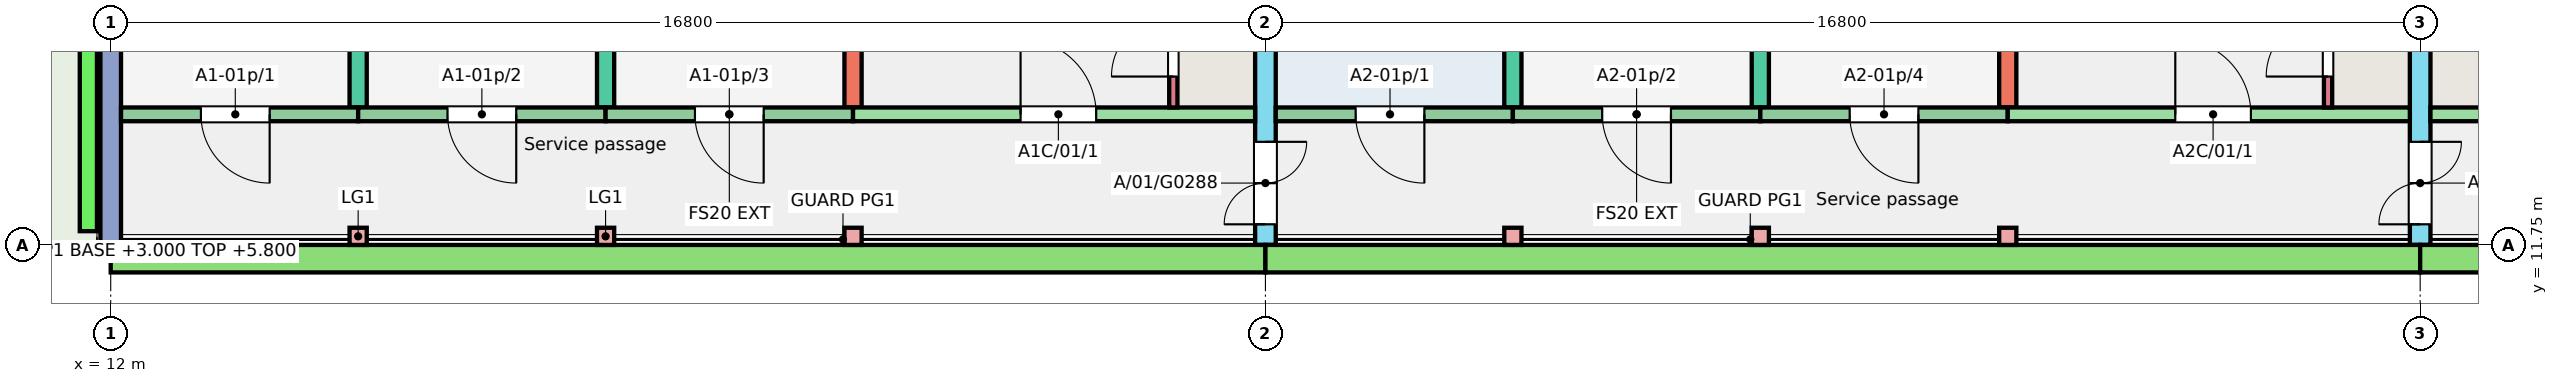
"""IFC4 building model, lengths in metres.
Left out: names, types, materials, properties, quantities, classifications, styles, units other than length and angle.
Written with IfcOpenShell. Run it as: python <this file> out.ifc"""

import sys

from ifc_helpers import new_model, si_unit, direction, frame, frame_2d, origin, origin_2d, place, context, subcontext, project, spatial, rectangle, extrude, element, fill, save


model = new_model("IFC4")
c1 = context("Model", 3, precision=1e-05, world=origin(), true_north=direction((0.0, 1.0)))
c2 = subcontext(c1, "Body", "Model", "MODEL_VIEW")
j1 = project(units=[si_unit("LENGTHUNIT", "METRE"), si_unit("PLANEANGLEUNIT", "RADIAN")], contexts=[c1])
p1 = place(None, origin())
s1 = spatial("IfcSite", under=j1, at=p1, CompositionType="ELEMENT")
p2 = place(p1, origin())
s2 = spatial("IfcBuilding", under=s1, at=p2, CompositionType="ELEMENT")
p3 = place(p2, frame((0.0, 0.0, 3.0)))
s3 = spatial("IfcBuildingStorey", under=s2, at=p3, CompositionType="ELEMENT", Elevation=3.0)
p4 = place(p3, frame((12.0, 11.75, 0.0), z_axis=(0.0, 0.0, 1.0), x_axis=(0.0, 1.0, 0.0)))
e1 = element("IfcWall", 1, at=p4, inside=s3, PredefinedType="SHEAR", context=c2, shape_type="SweptSolid", body=[
    extrude(rectangle(XDim=11.0, YDim=0.3, at=frame_2d((5.5, 0.0))), origin(), (0.0, 0.0, 1.0), 3.0),
])
for number, where, z_axis, x_axis in (
    (2, (15.6, 13.75, 0.0), (0.0, 0.0, 1.0), (0.0, 1.0, 0.0)),
    (3, (19.2, 13.75, 0.0), (0.0, 0.0, 1.0), (0.0, 1.0, 0.0)),
    (4, (22.8, 13.75, 0.0), (0.0, 0.0, 1.0), (0.0, 1.0, 0.0)),
):
    element("IfcWall", number, at=place(p3, frame(where, z_axis=z_axis, x_axis=x_axis)), inside=s3, PredefinedType="SHEAR", context=c2, shape_type="SweptSolid", body=[
        extrude(rectangle(XDim=9.0, YDim=0.25, at=frame_2d((4.5, 0.0))), origin(), (0.0, 0.0, 1.0), 3.0),
    ])
p5 = place(p3, frame((28.8, 11.75, 0.0), z_axis=(0.0, 0.0, 1.0), x_axis=(0.0, 1.0, 0.0)))
e5 = element("IfcWall", 5, at=p5, inside=s3, PredefinedType="SHEAR", context=c2, shape_type="SweptSolid", body=[
    extrude(rectangle(XDim=11.0, YDim=0.3, at=frame_2d((5.5, 0.0))), origin(), (0.0, 0.0, 1.0), 3.0),
])
p6 = place(p5, frame((0.3, 0.0, 0.0)))
e6 = element("IfcOpeningElement", 6, at=p6, cuts=e5, PredefinedType="OPENING", context=c2, shape_type="SweptSolid", body=[
    extrude(rectangle(XDim=1.2, YDim=2.1, at=frame_2d((0.6, 1.05))), frame((0.0, 0.16, 0.0), z_axis=(0.0, -1.0, 0.0), x_axis=(1.0, 0.0, 0.0)), (0.0, 0.0, 1.0), 0.32),
])
for number, where, z_axis, x_axis in (
    (7, (32.4, 13.75, 0.0), (0.0, 0.0, 1.0), (0.0, 1.0, 0.0)),
    (8, (36.0, 13.75, 0.0), (0.0, 0.0, 1.0), (0.0, 1.0, 0.0)),
    (9, (39.6, 13.75, 0.0), (0.0, 0.0, 1.0), (0.0, 1.0, 0.0)),
):
    element("IfcWall", number, at=place(p3, frame(where, z_axis=z_axis, x_axis=x_axis)), inside=s3, PredefinedType="SHEAR", context=c2, shape_type="SweptSolid", body=[
        extrude(rectangle(XDim=9.0, YDim=0.25, at=frame_2d((4.5, 0.0))), origin(), (0.0, 0.0, 1.0), 3.0),
    ])
p7 = place(p3, frame((45.6, 11.75, 0.0), z_axis=(0.0, 0.0, 1.0), x_axis=(0.0, 1.0, 0.0)))
e10 = element("IfcWall", 10, at=p7, inside=s3, PredefinedType="SHEAR", context=c2, shape_type="SweptSolid", body=[
    extrude(rectangle(XDim=11.0, YDim=0.3, at=frame_2d((5.5, 0.0))), origin(), (0.0, 0.0, 1.0), 3.0),
])
p8 = place(p7, frame((0.3, 0.0, 0.0)))
e11 = element("IfcOpeningElement", 11, at=p8, cuts=e10, PredefinedType="OPENING", context=c2, shape_type="SweptSolid", body=[
    extrude(rectangle(XDim=1.2, YDim=2.1, at=frame_2d((0.6, 1.05))), frame((0.0, 0.16, 0.0), z_axis=(0.0, -1.0, 0.0), x_axis=(1.0, 0.0, 0.0)), (0.0, 0.0, 1.0), 0.32),
])
p9 = place(p3, frame((12.15, 13.65, 0.0), z_axis=(0.0, 0.0, 1.0), x_axis=(1.0, 0.0, 0.0)))
e12 = element("IfcWall", 12, at=p9, inside=s3, PredefinedType="SOLIDWALL", context=c2, shape_type="SweptSolid", body=[
    extrude(rectangle(XDim=3.45, YDim=0.2, at=frame_2d((1.725, 0.0))), origin(), (0.0, 0.0, 1.0), 3.0),
])
p10 = place(p9, frame((1.163, 0.0, 0.0)))
e13 = element("IfcOpeningElement", 13, at=p10, cuts=e12, PredefinedType="OPENING", context=c2, shape_type="SweptSolid", body=[
    extrude(rectangle(XDim=1.0, YDim=2.1, at=frame_2d((0.5, 1.05))), frame((0.0, 0.11, 0.0), z_axis=(0.0, -1.0, 0.0), x_axis=(1.0, 0.0, 0.0)), (0.0, 0.0, 1.0), 0.22),
])
p11 = place(p3, frame((15.6, 13.65, 0.0), z_axis=(0.0, 0.0, 1.0), x_axis=(1.0, 0.0, 0.0)))
e14 = element("IfcWall", 14, at=p11, inside=s3, PredefinedType="SOLIDWALL", context=c2, shape_type="SweptSolid", body=[
    extrude(rectangle(XDim=3.6, YDim=0.2, at=frame_2d((1.8, 0.0))), origin(), (0.0, 0.0, 1.0), 3.0),
])
p12 = place(p11, frame((1.3, 0.0, 0.0)))
e15 = element("IfcOpeningElement", 15, at=p12, cuts=e14, PredefinedType="OPENING", context=c2, shape_type="SweptSolid", body=[
    extrude(rectangle(XDim=1.0, YDim=2.1, at=frame_2d((0.5, 1.05))), frame((0.0, 0.11, 0.0), z_axis=(0.0, -1.0, 0.0), x_axis=(1.0, 0.0, 0.0)), (0.0, 0.0, 1.0), 0.22),
])
p13 = place(p3, frame((19.2, 13.65, 0.0), z_axis=(0.0, 0.0, 1.0), x_axis=(1.0, 0.0, 0.0)))
e16 = element("IfcWall", 16, at=p13, inside=s3, PredefinedType="SOLIDWALL", context=c2, shape_type="SweptSolid", body=[
    extrude(rectangle(XDim=3.6, YDim=0.2, at=frame_2d((1.8, 0.0))), origin(), (0.0, 0.0, 1.0), 3.0),
])
p14 = place(p13, frame((1.3, 0.0, 0.0)))
e17 = element("IfcOpeningElement", 17, at=p14, cuts=e16, PredefinedType="OPENING", context=c2, shape_type="SweptSolid", body=[
    extrude(rectangle(XDim=1.0, YDim=2.1, at=frame_2d((0.5, 1.05))), frame((0.0, 0.11, 0.0), z_axis=(0.0, -1.0, 0.0), x_axis=(1.0, 0.0, 0.0)), (0.0, 0.0, 1.0), 0.22),
])
p15 = place(p3, frame((22.8, 13.65, 0.0), z_axis=(0.0, 0.0, 1.0), x_axis=(1.0, 0.0, 0.0)))
e18 = element("IfcWall", 18, at=p15, inside=s3, PredefinedType="SHEAR", context=c2, shape_type="SweptSolid", body=[
    extrude(rectangle(XDim=5.85, YDim=0.2, at=frame_2d((2.925, 0.0))), origin(), (0.0, 0.0, 1.0), 3.0),
])
p16 = place(p15, frame((2.438, 0.0, 0.0)))
e19 = element("IfcOpeningElement", 19, at=p16, cuts=e18, PredefinedType="OPENING", context=c2, shape_type="SweptSolid", body=[
    extrude(rectangle(XDim=1.1, YDim=2.1, at=frame_2d((0.55, 1.05))), frame((0.0, 0.11, 0.0), z_axis=(0.0, -1.0, 0.0), x_axis=(1.0, 0.0, 0.0)), (0.0, 0.0, 1.0), 0.22),
])
p17 = place(p3, frame((27.46, 13.75, 0.0), z_axis=(0.0, 0.0, 1.0), x_axis=(0.0, 1.0, 0.0)))
e20 = element("IfcWall", 20, at=p17, inside=s3, PredefinedType="SHEAR", context=c2, shape_type="SweptSolid", body=[
    extrude(rectangle(XDim=1.72, YDim=0.12, at=frame_2d((0.86, 0.0))), origin(), (0.0, 0.0, 1.0), 3.0),
])
p18 = place(p17, frame((0.45, 0.0, 0.0)))
e21 = element("IfcOpeningElement", 21, at=p18, cuts=e20, PredefinedType="OPENING", context=c2, shape_type="SweptSolid", body=[
    extrude(rectangle(XDim=0.9, YDim=2.1, at=frame_2d((0.45, 1.05))), frame((0.0, 0.07, 0.0), z_axis=(0.0, -1.0, 0.0), x_axis=(1.0, 0.0, 0.0)), (0.0, 0.0, 1.0), 0.14),
])
p19 = place(p3, frame((28.95, 13.65, 0.0), z_axis=(0.0, 0.0, 1.0), x_axis=(1.0, 0.0, 0.0)))
e22 = element("IfcWall", 22, at=p19, inside=s3, PredefinedType="SOLIDWALL", context=c2, shape_type="SweptSolid", body=[
    extrude(rectangle(XDim=3.45, YDim=0.2, at=frame_2d((1.725, 0.0))), origin(), (0.0, 0.0, 1.0), 3.0),
])
p20 = place(p19, frame((1.163, 0.0, 0.0)))
e23 = element("IfcOpeningElement", 23, at=p20, cuts=e22, PredefinedType="OPENING", context=c2, shape_type="SweptSolid", body=[
    extrude(rectangle(XDim=1.0, YDim=2.1, at=frame_2d((0.5, 1.05))), frame((0.0, 0.11, 0.0), z_axis=(0.0, -1.0, 0.0), x_axis=(1.0, 0.0, 0.0)), (0.0, 0.0, 1.0), 0.22),
])
p21 = place(p3, frame((32.4, 13.65, 0.0), z_axis=(0.0, 0.0, 1.0), x_axis=(1.0, 0.0, 0.0)))
e24 = element("IfcWall", 24, at=p21, inside=s3, PredefinedType="SOLIDWALL", context=c2, shape_type="SweptSolid", body=[
    extrude(rectangle(XDim=3.6, YDim=0.2, at=frame_2d((1.8, 0.0))), origin(), (0.0, 0.0, 1.0), 3.0),
])
p22 = place(p21, frame((1.3, 0.0, 0.0)))
e25 = element("IfcOpeningElement", 25, at=p22, cuts=e24, PredefinedType="OPENING", context=c2, shape_type="SweptSolid", body=[
    extrude(rectangle(XDim=1.0, YDim=2.1, at=frame_2d((0.5, 1.05))), frame((0.0, 0.11, 0.0), z_axis=(0.0, -1.0, 0.0), x_axis=(1.0, 0.0, 0.0)), (0.0, 0.0, 1.0), 0.22),
])
p23 = place(p3, frame((36.0, 13.65, 0.0), z_axis=(0.0, 0.0, 1.0), x_axis=(1.0, 0.0, 0.0)))
e26 = element("IfcWall", 26, at=p23, inside=s3, PredefinedType="SOLIDWALL", context=c2, shape_type="SweptSolid", body=[
    extrude(rectangle(XDim=3.6, YDim=0.2, at=frame_2d((1.8, 0.0))), origin(), (0.0, 0.0, 1.0), 3.0),
])
p24 = place(p23, frame((1.3, 0.0, 0.0)))
e27 = element("IfcOpeningElement", 27, at=p24, cuts=e26, PredefinedType="OPENING", context=c2, shape_type="SweptSolid", body=[
    extrude(rectangle(XDim=1.0, YDim=2.1, at=frame_2d((0.5, 1.05))), frame((0.0, 0.11, 0.0), z_axis=(0.0, -1.0, 0.0), x_axis=(1.0, 0.0, 0.0)), (0.0, 0.0, 1.0), 0.22),
])
p25 = place(p3, frame((39.6, 13.65, 0.0), z_axis=(0.0, 0.0, 1.0), x_axis=(1.0, 0.0, 0.0)))
e28 = element("IfcWall", 28, at=p25, inside=s3, PredefinedType="SHEAR", context=c2, shape_type="SweptSolid", body=[
    extrude(rectangle(XDim=5.85, YDim=0.2, at=frame_2d((2.925, 0.0))), origin(), (0.0, 0.0, 1.0), 3.0),
])
p26 = place(p25, frame((2.438, 0.0, 0.0)))
e29 = element("IfcOpeningElement", 29, at=p26, cuts=e28, PredefinedType="OPENING", context=c2, shape_type="SweptSolid", body=[
    extrude(rectangle(XDim=1.1, YDim=2.1, at=frame_2d((0.55, 1.05))), frame((0.0, 0.11, 0.0), z_axis=(0.0, -1.0, 0.0), x_axis=(1.0, 0.0, 0.0)), (0.0, 0.0, 1.0), 0.22),
])
p27 = place(p3, frame((44.26, 13.75, 0.0), z_axis=(0.0, 0.0, 1.0), x_axis=(0.0, 1.0, 0.0)))
e30 = element("IfcWall", 30, at=p27, inside=s3, PredefinedType="SHEAR", context=c2, shape_type="SweptSolid", body=[
    extrude(rectangle(XDim=1.72, YDim=0.12, at=frame_2d((0.86, 0.0))), origin(), (0.0, 0.0, 1.0), 3.0),
])
p28 = place(p27, frame((0.45, 0.0, 0.0)))
e31 = element("IfcOpeningElement", 31, at=p28, cuts=e30, PredefinedType="OPENING", context=c2, shape_type="SweptSolid", body=[
    extrude(rectangle(XDim=0.9, YDim=2.1, at=frame_2d((0.45, 1.05))), frame((0.0, 0.07, 0.0), z_axis=(0.0, -1.0, 0.0), x_axis=(1.0, 0.0, 0.0)), (0.0, 0.0, 1.0), 0.14),
])
p29 = place(p3, frame((45.75, 13.65, 0.0), z_axis=(0.0, 0.0, 1.0), x_axis=(1.0, 0.0, 0.0)))
e32 = element("IfcWall", 32, at=p29, inside=s3, PredefinedType="SHEAR", context=c2, shape_type="SweptSolid", body=[
    extrude(rectangle(XDim=5.85, YDim=0.2, at=frame_2d((2.925, 0.0))), origin(), (0.0, 0.0, 1.0), 3.0),
])
p30 = place(p29, frame((2.312, 0.0, 0.0)))
e33 = element("IfcOpeningElement", 33, at=p30, cuts=e32, PredefinedType="OPENING", context=c2, shape_type="SweptSolid", body=[
    extrude(rectangle(XDim=1.1, YDim=2.1, at=frame_2d((0.55, 1.05))), frame((0.0, 0.11, 0.0), z_axis=(0.0, -1.0, 0.0), x_axis=(1.0, 0.0, 0.0)), (0.0, 0.0, 1.0), 0.22),
])
for number, where, z_axis, x_axis in (
    (34, (15.6, 11.875, 0.0), (0.0, 0.0, 1.0), (1.0, 0.0, 0.0)),
    (35, (19.2, 11.875, 0.0), (0.0, 0.0, 1.0), (1.0, 0.0, 0.0)),
    (36, (22.8, 11.875, 0.0), (0.0, 0.0, 1.0), (1.0, 0.0, 0.0)),
    (37, (32.4, 11.875, 0.0), (0.0, 0.0, 1.0), (1.0, 0.0, 0.0)),
    (38, (36.0, 11.875, 0.0), (0.0, 0.0, 1.0), (1.0, 0.0, 0.0)),
    (39, (39.6, 11.875, 0.0), (0.0, 0.0, 1.0), (1.0, 0.0, 0.0)),
):
    element("IfcColumn", number, at=place(p3, frame(where, z_axis=z_axis, x_axis=x_axis)), inside=s3, PredefinedType="COLUMN", context=c2, shape_type="SweptSolid", body=[
        extrude(rectangle(XDim=0.25, YDim=0.25, at=origin_2d()), origin(), (0.0, 0.0, 1.0), 3.0),
    ])
for number, where, z_axis, x_axis in (
    (40, (12.0, 11.55, 0.0), (0.0, 0.0, 1.0), (1.0, 0.0, 0.0)),
    (41, (28.8, 11.55, 0.0), (0.0, 0.0, 1.0), (1.0, 0.0, 0.0)),
):
    element("IfcWall", number, at=place(p3, frame(where, z_axis=z_axis, x_axis=x_axis)), inside=s3, PredefinedType="SOLIDWALL", context=c2, shape_type="SweptSolid", body=[
        extrude(rectangle(XDim=16.8, YDim=0.4, at=frame_2d((8.4, 0.0))), origin(), (0.0, 0.0, 1.0), 2.85),
    ])
p31 = place(p3, frame((45.6, 11.55, 0.0), z_axis=(0.0, 0.0, 1.0), x_axis=(1.0, 0.0, 0.0)))
e42 = element("IfcWall", 42, at=p31, inside=s3, PredefinedType="SOLIDWALL", context=c2, shape_type="SweptSolid", body=[
    extrude(rectangle(XDim=16.8, YDim=0.4, at=frame_2d((8.4, 0.0))), origin(), (0.0, 0.0, 1.0), 2.85),
])
p32 = place(p2, origin())
s4 = spatial("IfcBuildingStorey", under=s2, at=p32, CompositionType="ELEMENT", Elevation=0.0)
p33 = place(p32, frame((9.7, 11.55, -0.25), z_axis=(0.0, 0.0, 1.0), x_axis=(1.0, 0.0, 0.0)))
e43 = element("IfcWall", 43, at=p33, inside=s4, PredefinedType="SOLIDWALL", context=c2, shape_type="SweptSolid", body=[
    extrude(rectangle(XDim=2.3, YDim=0.4, at=frame_2d((1.15, 0.0))), origin(), (0.0, 0.0, 1.0), 6.25),
])
p34 = place(p3, frame((11.675, 11.95, 0.0), z_axis=(0.0, 0.0, 1.0), x_axis=(0.0, 1.0, 0.0)))
e44 = element("IfcWall", 44, at=p34, inside=s3, PredefinedType="PARAPET", context=c2, shape_type="SweptSolid", body=[
    extrude(rectangle(XDim=10.5, YDim=0.25, at=frame_2d((5.25, 0.0))), origin(), (0.0, 0.0, 1.0), 1.1),
])
p35 = place(p10, origin())
e45 = element("IfcDoor", 45, at=p35, inside=s3, OperationType="SINGLE_SWING_RIGHT", PredefinedType="DOOR", context=c2, shape_type="SweptSolid", body=[
    extrude(rectangle(XDim=1.0, YDim=2.1, at=frame_2d((0.5, 1.05))), frame((0.0, 0.025, 0.0), z_axis=(0.0, -1.0, 0.0), x_axis=(1.0, 0.0, 0.0)), (0.0, 0.0, 1.0), 0.05),
])
fill(e13, e45)
p36 = place(p12, origin())
e46 = element("IfcDoor", 46, at=p36, inside=s3, OperationType="SINGLE_SWING_RIGHT", PredefinedType="DOOR", context=c2, shape_type="SweptSolid", body=[
    extrude(rectangle(XDim=1.0, YDim=2.1, at=frame_2d((0.5, 1.05))), frame((0.0, 0.025, 0.0), z_axis=(0.0, -1.0, 0.0), x_axis=(1.0, 0.0, 0.0)), (0.0, 0.0, 1.0), 0.05),
])
fill(e15, e46)
p37 = place(p14, origin())
e47 = element("IfcDoor", 47, at=p37, inside=s3, OperationType="SINGLE_SWING_RIGHT", PredefinedType="DOOR", context=c2, shape_type="SweptSolid", body=[
    extrude(rectangle(XDim=1.0, YDim=2.1, at=frame_2d((0.5, 1.05))), frame((0.0, 0.025, 0.0), z_axis=(0.0, -1.0, 0.0), x_axis=(1.0, 0.0, 0.0)), (0.0, 0.0, 1.0), 0.05),
])
fill(e17, e47)
p38 = place(p20, origin())
e48 = element("IfcDoor", 48, at=p38, inside=s3, OperationType="SINGLE_SWING_RIGHT", PredefinedType="DOOR", context=c2, shape_type="SweptSolid", body=[
    extrude(rectangle(XDim=1.0, YDim=2.1, at=frame_2d((0.5, 1.05))), frame((0.0, 0.025, 0.0), z_axis=(0.0, -1.0, 0.0), x_axis=(1.0, 0.0, 0.0)), (0.0, 0.0, 1.0), 0.05),
])
fill(e23, e48)
p39 = place(p22, origin())
e49 = element("IfcDoor", 49, at=p39, inside=s3, OperationType="SINGLE_SWING_RIGHT", PredefinedType="DOOR", context=c2, shape_type="SweptSolid", body=[
    extrude(rectangle(XDim=1.0, YDim=2.1, at=frame_2d((0.5, 1.05))), frame((0.0, 0.025, 0.0), z_axis=(0.0, -1.0, 0.0), x_axis=(1.0, 0.0, 0.0)), (0.0, 0.0, 1.0), 0.05),
])
fill(e25, e49)
p40 = place(p24, origin())
e50 = element("IfcDoor", 50, at=p40, inside=s3, OperationType="SINGLE_SWING_RIGHT", PredefinedType="DOOR", context=c2, shape_type="SweptSolid", body=[
    extrude(rectangle(XDim=1.0, YDim=2.1, at=frame_2d((0.5, 1.05))), frame((0.0, 0.025, 0.0), z_axis=(0.0, -1.0, 0.0), x_axis=(1.0, 0.0, 0.0)), (0.0, 0.0, 1.0), 0.05),
])
fill(e27, e50)
p41 = place(p16, origin())
e51 = element("IfcDoor", 51, at=p41, inside=s3, OperationType="SINGLE_SWING_LEFT", PredefinedType="DOOR", context=c2, shape_type="SweptSolid", body=[
    extrude(rectangle(XDim=1.1, YDim=2.1, at=frame_2d((0.55, 1.05))), frame((0.0, 0.025, 0.0), z_axis=(0.0, -1.0, 0.0), x_axis=(1.0, 0.0, 0.0)), (0.0, 0.0, 1.0), 0.05),
])
fill(e19, e51)
p42 = place(p18, origin())
e52 = element("IfcDoor", 52, at=p42, inside=s3, OperationType="SINGLE_SWING_LEFT", PredefinedType="DOOR", context=c2, shape_type="SweptSolid", body=[
    extrude(rectangle(XDim=0.9, YDim=2.1, at=frame_2d((0.45, 1.05))), frame((0.0, 0.025, 0.0), z_axis=(0.0, -1.0, 0.0), x_axis=(1.0, 0.0, 0.0)), (0.0, 0.0, 1.0), 0.05),
])
fill(e21, e52)
p43 = place(p26, origin())
e53 = element("IfcDoor", 53, at=p43, inside=s3, OperationType="SINGLE_SWING_LEFT", PredefinedType="DOOR", context=c2, shape_type="SweptSolid", body=[
    extrude(rectangle(XDim=1.1, YDim=2.1, at=frame_2d((0.55, 1.05))), frame((0.0, 0.025, 0.0), z_axis=(0.0, -1.0, 0.0), x_axis=(1.0, 0.0, 0.0)), (0.0, 0.0, 1.0), 0.05),
])
fill(e29, e53)
p44 = place(p28, origin())
e54 = element("IfcDoor", 54, at=p44, inside=s3, OperationType="SINGLE_SWING_LEFT", PredefinedType="DOOR", context=c2, shape_type="SweptSolid", body=[
    extrude(rectangle(XDim=0.9, YDim=2.1, at=frame_2d((0.45, 1.05))), frame((0.0, 0.025, 0.0), z_axis=(0.0, -1.0, 0.0), x_axis=(1.0, 0.0, 0.0)), (0.0, 0.0, 1.0), 0.05),
])
fill(e31, e54)
p45 = place(p6, origin())
e55 = element("IfcDoor", 55, at=p45, inside=s3, OperationType="DOUBLE_DOOR_SINGLE_SWING", PredefinedType="DOOR", context=c2, shape_type="SweptSolid", body=[
    extrude(rectangle(XDim=1.2, YDim=2.1, at=frame_2d((0.6, 1.05))), frame((0.0, 0.025, 0.0), z_axis=(0.0, -1.0, 0.0), x_axis=(1.0, 0.0, 0.0)), (0.0, 0.0, 1.0), 0.05),
])
fill(e6, e55)
p46 = place(p8, origin())
e56 = element("IfcDoor", 56, at=p46, inside=s3, OperationType="DOUBLE_DOOR_SINGLE_SWING", PredefinedType="DOOR", context=c2, shape_type="SweptSolid", body=[
    extrude(rectangle(XDim=1.2, YDim=2.1, at=frame_2d((0.6, 1.05))), frame((0.0, 0.025, 0.0), z_axis=(0.0, -1.0, 0.0), x_axis=(1.0, 0.0, 0.0)), (0.0, 0.0, 1.0), 0.05),
])
fill(e11, e56)
save(model, sys.argv[1])
